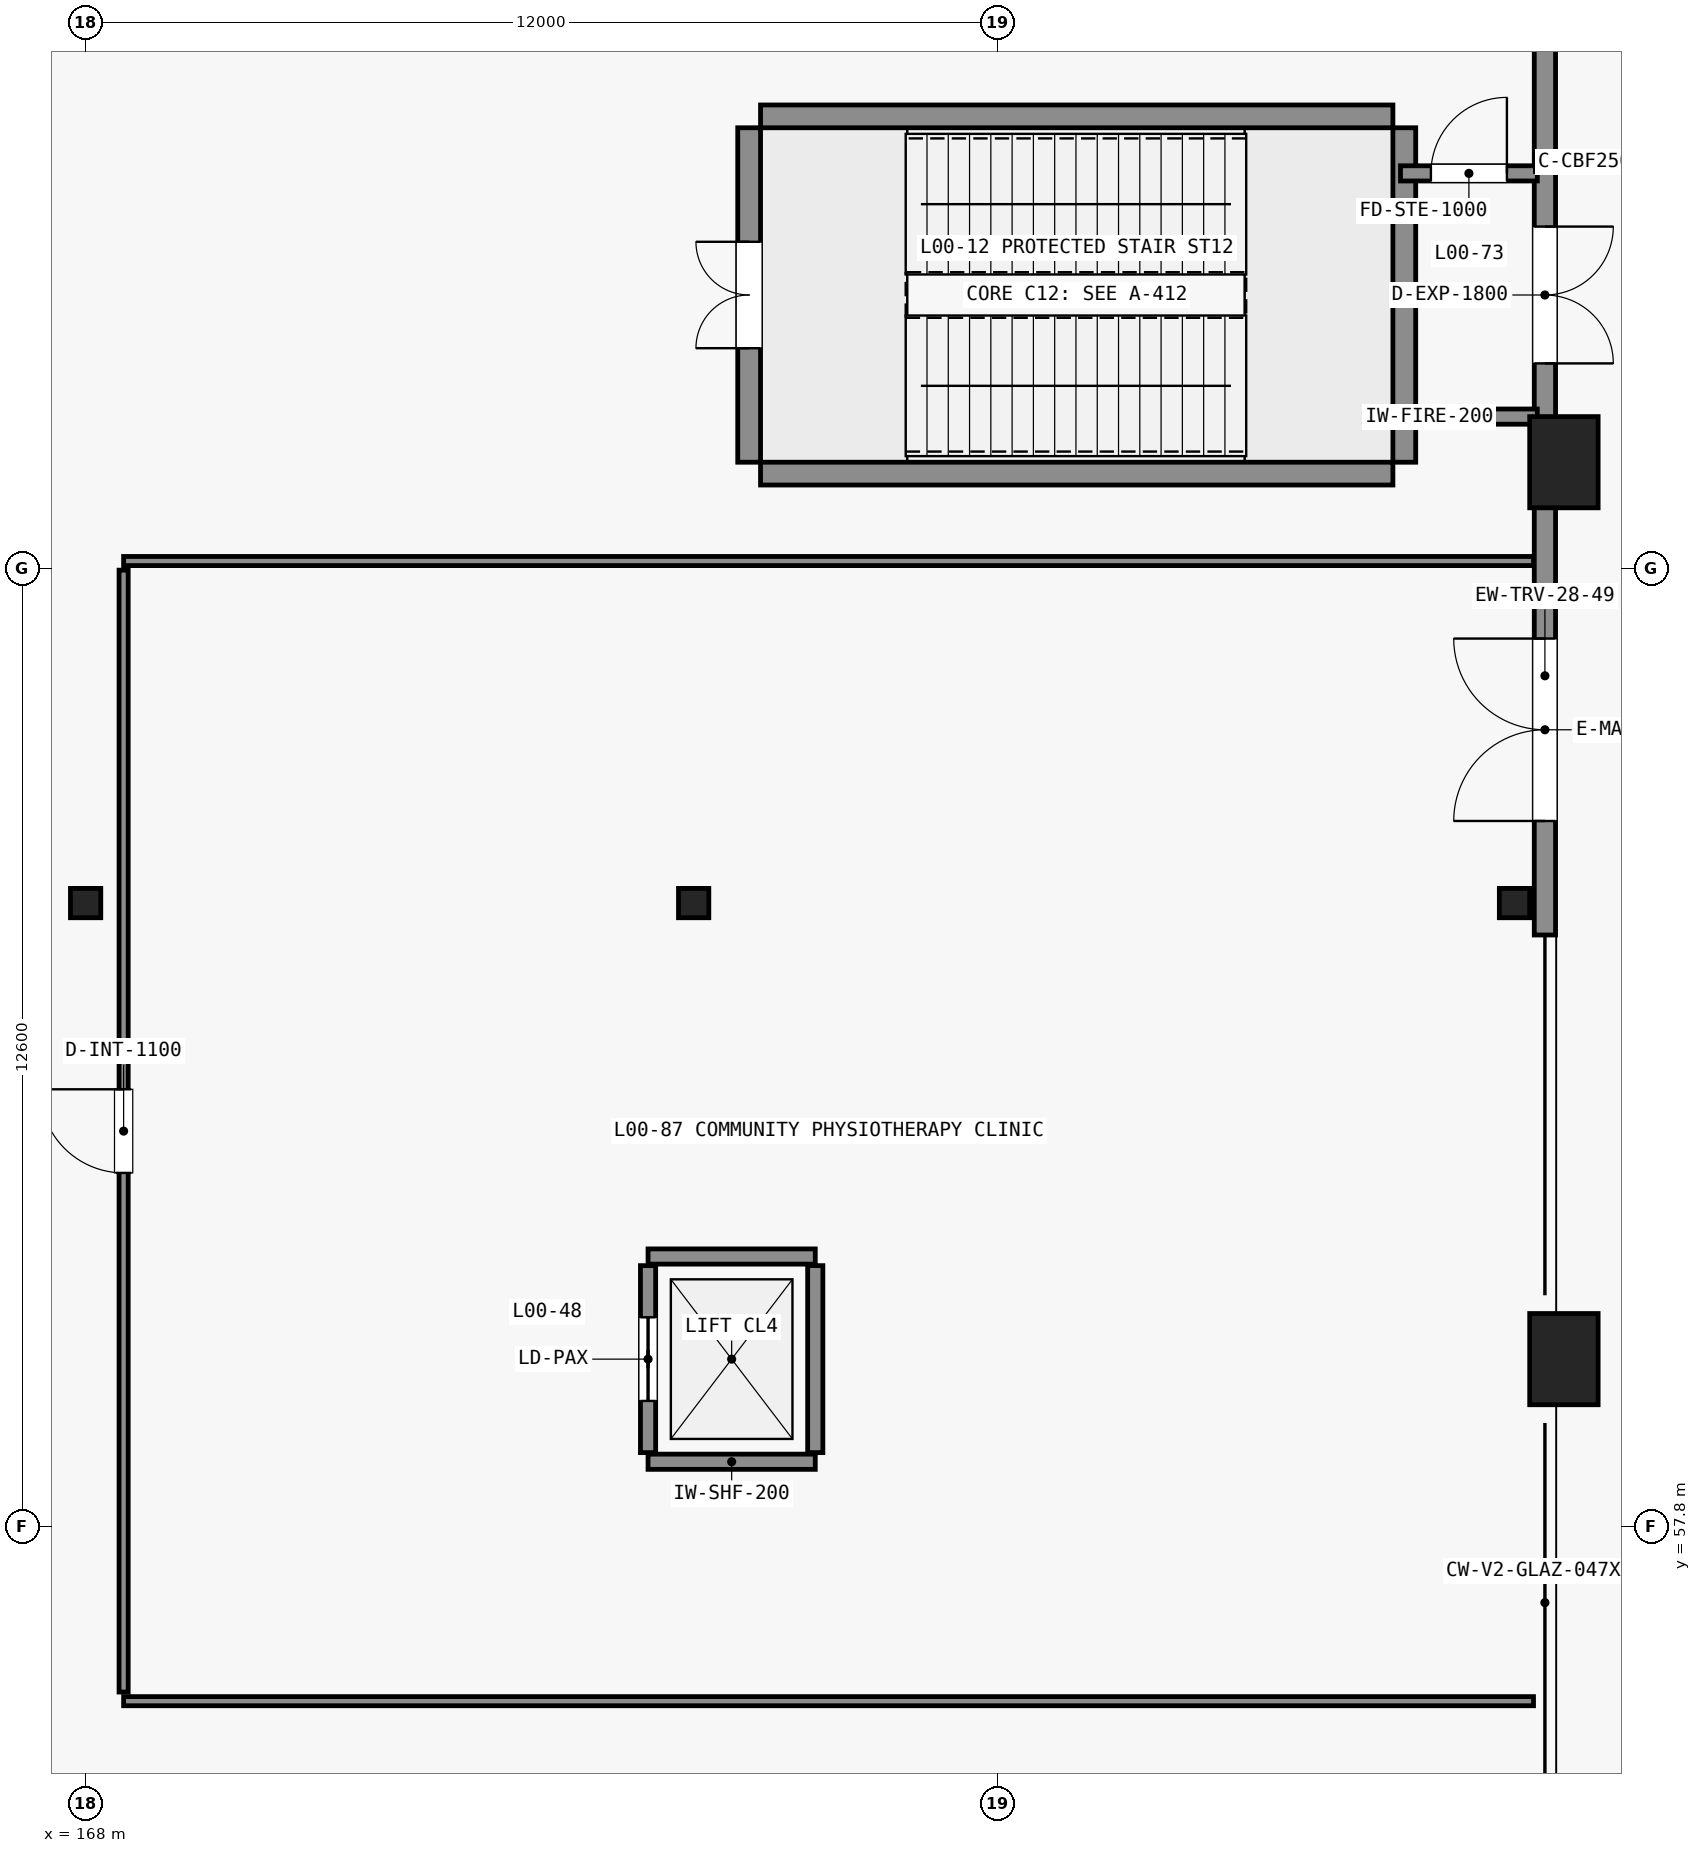
"""IFC4 building model, lengths in metres.
Left out: names, types, materials, properties, quantities, classifications, styles, units other than length and angle.
Written with IfcOpenShell. Run it as: python <this file> out.ifc"""

import sys

from ifc_helpers import new_model, si_unit, direction, frame, frame_2d, origin, origin_2d, place, context, subcontext, project, spatial, rectangle, hollow_rectangle, i_section, extrude, element, fill, save


model = new_model("IFC4")
c1 = context("Model", 3, precision=1e-05, world=origin(), true_north=direction((0.0, 1.0)))
c2 = subcontext(c1, "Body", "Model", "MODEL_VIEW")
j1 = project(units=[si_unit("LENGTHUNIT", "METRE"), si_unit("PLANEANGLEUNIT", "RADIAN")], contexts=[c1])
p1 = place(None, origin())
s1 = spatial("IfcSite", under=j1, at=p1, CompositionType="ELEMENT")
p2 = place(p1, origin())
s2 = spatial("IfcBuilding", under=s1, at=p2, CompositionType="ELEMENT")
p3 = place(p2, origin())
s3 = spatial("IfcBuildingStorey", under=s2, at=p3, CompositionType="ELEMENT", Elevation=0.0)
for number, where, z_axis, x_axis in (
    (1, (187.45, 60.0, -0.45), (0.0, 0.0, 1.0), (1.0, 0.0, 0.0)),
    (2, (187.45, 71.8, -0.45), (0.0, 0.0, 1.0), (1.0, 0.0, 0.0)),
):
    element("IfcColumn", number, at=place(p3, frame(where, z_axis=z_axis, x_axis=x_axis)), inside=s3, PredefinedType="PILASTER", context=c2, shape_type="SweptSolid", body=[
        extrude(rectangle(XDim=0.9, YDim=1.2, at=origin_2d()), origin(), (0.0, 0.0, 1.0), 6.45),
    ])
p4 = place(p3, frame((187.2, 75.75, -0.45), z_axis=(0.0, 0.0, 1.0), x_axis=(1.0, 0.0, 0.0)))
e3 = element("IfcColumn", 3, at=p4, inside=s3, PredefinedType="COLUMN", context=c2, shape_type="SweptSolid", body=[
    extrude(hollow_rectangle(XDim=0.25, YDim=0.25, WallThickness=0.012, at=origin_2d()), origin(), (0.0, 0.0, 1.0), 6.45),
])
for number, where, z_axis, x_axis in (
    (4, (168.0, 66.0, -0.45), (0.0, 0.0, 1.0), (1.0, 0.0, 0.0)),
    (5, (176.0, 66.0, -0.45), (0.0, 0.0, 1.0), (1.0, 0.0, 0.0)),
    (6, (186.8, 66.0, -0.45), (0.0, 0.0, 1.0), (1.0, 0.0, 0.0)),
):
    element("IfcColumn", number, at=place(p3, frame(where, z_axis=z_axis, x_axis=x_axis)), inside=s3, PredefinedType="COLUMN", context=c2, shape_type="SweptSolid", body=[
        extrude(i_section(OverallWidth=0.399, OverallDepth=0.386, WebThickness=0.021, FlangeThickness=0.033, FilletRadius=0.018, at=origin_2d()), origin(), (0.0, 0.0, 1.0), 6.45),
    ])
for number, where, z_axis, x_axis in (
    (7, (176.88, 71.65, 0.0), (0.0, 0.0, 1.0), (1.0, 0.0, 0.0)),
    (8, (176.88, 76.35, 0.0), (0.0, 0.0, 1.0), (1.0, 0.0, 0.0)),
):
    element("IfcWall", number, at=place(p3, frame(where, z_axis=z_axis, x_axis=x_axis)), inside=s3, PredefinedType="SHEAR", context=c2, shape_type="SweptSolid", body=[
        extrude(rectangle(XDim=8.32, YDim=0.3, at=frame_2d((4.16, 0.0))), origin(), (0.0, 0.0, 1.0), 6.0),
    ])
p5 = place(p3, frame((176.73, 71.8, 0.0), z_axis=(0.0, 0.0, 1.0), x_axis=(0.0, 1.0, 0.0)))
e9 = element("IfcWall", 9, at=p5, inside=s3, PredefinedType="SHEAR", context=c2, shape_type="SweptSolid", body=[
    extrude(rectangle(XDim=4.4, YDim=0.3, at=frame_2d((2.2, 0.0))), origin(), (0.0, 0.0, 1.0), 6.0),
])
p6 = place(p5, frame((1.5, 0.0, 0.0)))
e10 = element("IfcOpeningElement", 10, at=p6, cuts=e9, PredefinedType="OPENING", context=c2, shape_type="SweptSolid", body=[
    extrude(rectangle(XDim=1.4, YDim=2.2, at=frame_2d((0.7, 1.1))), frame((0.0, 0.16, 0.0), z_axis=(0.0, -1.0, 0.0), x_axis=(1.0, 0.0, 0.0)), (0.0, 0.0, 1.0), 0.32),
])
p7 = place(p3, frame((185.35, 71.8, 0.0), z_axis=(0.0, 0.0, 1.0), x_axis=(0.0, 1.0, 0.0)))
e11 = element("IfcWall", 11, at=p7, inside=s3, PredefinedType="SHEAR", context=c2, shape_type="SweptSolid", body=[
    extrude(rectangle(XDim=4.4, YDim=0.3, at=frame_2d((2.2, 0.0))), origin(), (0.0, 0.0, 1.0), 6.0),
])
for number, where, z_axis, x_axis in (
    (12, (175.4, 58.65, 0.0), (0.0, 0.0, 1.0), (1.0, 0.0, 0.0)),
    (13, (175.4, 61.35, 0.0), (0.0, 0.0, 1.0), (1.0, 0.0, 0.0)),
):
    element("IfcWall", number, at=place(p3, frame(where, z_axis=z_axis, x_axis=x_axis)), inside=s3, PredefinedType="STANDARD", context=c2, shape_type="SweptSolid", body=[
        extrude(rectangle(XDim=2.2, YDim=0.2, at=frame_2d((1.1, 0.0))), origin(), (0.0, 0.0, 1.0), 4.927),
    ])
p8 = place(p3, frame((175.4, 58.77, 0.0), z_axis=(0.0, 0.0, 1.0), x_axis=(0.0, 1.0, 0.0)))
e14 = element("IfcWall", 14, at=p8, inside=s3, PredefinedType="STANDARD", context=c2, shape_type="SweptSolid", body=[
    extrude(rectangle(XDim=2.46, YDim=0.2, at=frame_2d((1.23, 0.0))), origin(), (0.0, 0.0, 1.0), 5.62),
])
p9 = place(p8, frame((0.68, 0.0, 0.0)))
e15 = element("IfcOpeningElement", 15, at=p9, cuts=e14, PredefinedType="OPENING", context=c2, shape_type="SweptSolid", body=[
    extrude(rectangle(XDim=1.1, YDim=2.15, at=frame_2d((0.55, 1.075))), frame((0.0, 0.11, 0.0), z_axis=(0.0, -1.0, 0.0), x_axis=(1.0, 0.0, 0.0)), (0.0, 0.0, 1.0), 0.22),
])
p10 = place(p3, frame((177.6, 58.77, 0.0), z_axis=(0.0, 0.0, 1.0), x_axis=(0.0, 1.0, 0.0)))
e16 = element("IfcWall", 16, at=p10, inside=s3, PredefinedType="STANDARD", context=c2, shape_type="SweptSolid", body=[
    extrude(rectangle(XDim=2.46, YDim=0.2, at=frame_2d((1.23, 0.0))), origin(), (0.0, 0.0, 1.0), 5.62),
])
p11 = place(p3, frame((187.2, 65.58, 0.0), z_axis=(0.0, 0.0, 1.0), x_axis=(0.0, 1.0, 0.0)))
e17 = element("IfcWall", 17, at=p11, inside=s3, PredefinedType="STANDARD", context=c2, shape_type="SweptSolid", body=[
    extrude(rectangle(XDim=6.82, YDim=0.28, at=frame_2d((3.41, 0.0))), origin(), (0.0, 0.0, 1.0), 4.927),
])
p12 = place(p11, frame((1.5, 0.0, 0.0)))
e18 = element("IfcOpeningElement", 18, at=p12, cuts=e17, PredefinedType="OPENING", context=c2, shape_type="SweptSolid", body=[
    extrude(rectangle(XDim=2.4, YDim=2.5, at=frame_2d((1.2, 1.25))), frame((0.0, 0.15, 0.0), z_axis=(0.0, -1.0, 0.0), x_axis=(1.0, 0.0, 0.0)), (0.0, 0.0, 1.0), 0.3),
])
p13 = place(p3, frame((187.2, 75.6, 0.0), z_axis=(0.0, 0.0, 1.0), x_axis=(0.0, 1.0, 0.0)))
e19 = element("IfcWall", 19, at=p13, inside=s3, PredefinedType="STANDARD", context=c2, shape_type="SweptSolid", body=[
    extrude(rectangle(XDim=2.6, YDim=0.28, at=frame_2d((1.3, 0.0))), origin(), (0.0, 0.0, 1.0), 4.927),
])
p14 = place(p3, frame((187.2, 75.65, 0.0), z_axis=(0.0, 0.0, 1.0), x_axis=(0.0, -1.0, 0.0)))
e20 = element("IfcWall", 20, at=p14, inside=s3, PredefinedType="STANDARD", context=c2, shape_type="SweptSolid", body=[
    extrude(rectangle(XDim=3.3, YDim=0.28, at=frame_2d((1.65, 0.0))), origin(), (0.0, 0.0, 1.0), 5.62),
])
p15 = place(p14, frame((0.75, 0.0, 0.0)))
e21 = element("IfcOpeningElement", 21, at=p15, cuts=e20, PredefinedType="OPENING", context=c2, shape_type="SweptSolid", body=[
    extrude(rectangle(XDim=1.8, YDim=2.25, at=frame_2d((0.9, 1.125))), frame((0.0, 0.15, 0.0), z_axis=(0.0, -1.0, 0.0), x_axis=(1.0, 0.0, 0.0)), (0.0, 0.0, 1.0), 0.3),
])
p16 = place(p3, frame((185.3, 72.4, 0.0), z_axis=(0.0, 0.0, 1.0), x_axis=(1.0, 0.0, 0.0)))
e22 = element("IfcWall", 22, at=p16, inside=s3, PredefinedType="STANDARD", context=c2, shape_type="SweptSolid", body=[
    extrude(rectangle(XDim=1.8, YDim=0.2, at=frame_2d((0.9, 0.0))), origin(), (0.0, 0.0, 1.0), 4.927),
])
p17 = place(p3, frame((185.3, 75.6, 0.0), z_axis=(0.0, 0.0, 1.0), x_axis=(1.0, 0.0, 0.0)))
e23 = element("IfcWall", 23, at=p17, inside=s3, PredefinedType="STANDARD", context=c2, shape_type="SweptSolid", body=[
    extrude(rectangle(XDim=1.8, YDim=0.2, at=frame_2d((0.9, 0.0))), origin(), (0.0, 0.0, 1.0), 4.927),
])
p18 = place(p17, frame((0.4, 0.0, 0.0)))
e24 = element("IfcOpeningElement", 24, at=p18, cuts=e23, PredefinedType="OPENING", context=c2, shape_type="SweptSolid", body=[
    extrude(rectangle(XDim=1.0, YDim=2.15, at=frame_2d((0.5, 1.075))), frame((0.0, 0.11, 0.0), z_axis=(0.0, -1.0, 0.0), x_axis=(1.0, 0.0, 0.0)), (0.0, 0.0, 1.0), 0.22),
])
for number, where, z_axis, x_axis in (
    (25, (168.5, 55.5, 0.0), (0.0, 0.0, 1.0), (1.0, 0.0, 0.0)),
    (26, (168.5, 70.5, 0.0), (0.0, 0.0, 1.0), (1.0, 0.0, 0.0)),
):
    element("IfcWall", number, at=place(p3, frame(where, z_axis=z_axis, x_axis=x_axis)), inside=s3, PredefinedType="PARTITIONING", context=c2, shape_type="SweptSolid", body=[
        extrude(rectangle(XDim=18.55, YDim=0.12, at=frame_2d((9.275, 0.0))), origin(), (0.0, 0.0, 1.0), 4.927),
    ])
p19 = place(p3, frame((168.5, 55.62, 0.0), z_axis=(0.0, 0.0, 1.0), x_axis=(0.0, 1.0, 0.0)))
e27 = element("IfcWall", 27, at=p19, inside=s3, PredefinedType="PARTITIONING", context=c2, shape_type="SweptSolid", body=[
    extrude(rectangle(XDim=14.76, YDim=0.12, at=frame_2d((7.38, 0.0))), origin(), (0.0, 0.0, 1.0), 4.927),
])
p20 = place(p19, frame((6.83, 0.0, 0.0)))
e28 = element("IfcOpeningElement", 28, at=p20, cuts=e27, PredefinedType="OPENING", context=c2, shape_type="SweptSolid", body=[
    extrude(rectangle(XDim=1.1, YDim=2.2, at=frame_2d((0.55, 1.1))), frame((0.0, 0.07, 0.0), z_axis=(0.0, -1.0, 0.0), x_axis=(1.0, 0.0, 0.0)), (0.0, 0.0, 1.0), 0.14),
])
p21 = place(p9, origin())
e29 = element("IfcDoor", 29, at=p21, inside=s3, OperationType="SLIDING_TO_LEFT", PredefinedType="DOOR", context=c2, shape_type="SweptSolid", body=[
    extrude(rectangle(XDim=1.1, YDim=2.15, at=frame_2d((0.55, 1.075))), frame((0.0, 0.025, 0.0), z_axis=(0.0, -1.0, 0.0), x_axis=(1.0, 0.0, 0.0)), (0.0, 0.0, 1.0), 0.05),
])
fill(e15, e29)
p22 = place(p12, origin())
e30 = element("IfcDoor", 30, at=p22, inside=s3, OperationType="DOUBLE_DOOR_SINGLE_SWING", PredefinedType="DOOR", context=c2, shape_type="SweptSolid", body=[
    extrude(rectangle(XDim=2.4, YDim=2.5, at=frame_2d((1.2, 1.25))), frame((0.0, 0.025, 0.0), z_axis=(0.0, -1.0, 0.0), x_axis=(1.0, 0.0, 0.0)), (0.0, 0.0, 1.0), 0.05),
])
fill(e18, e30)
p23 = place(p6, origin())
e31 = element("IfcDoor", 31, at=p23, inside=s3, OperationType="DOUBLE_DOOR_SINGLE_SWING", PredefinedType="DOOR", context=c2, shape_type="SweptSolid", body=[
    extrude(rectangle(XDim=1.4, YDim=2.2, at=frame_2d((0.7, 1.1))), frame((0.0, 0.025, 0.0), z_axis=(0.0, -1.0, 0.0), x_axis=(1.0, 0.0, 0.0)), (0.0, 0.0, 1.0), 0.05),
])
fill(e10, e31)
p24 = place(p15, origin())
e32 = element("IfcDoor", 32, at=p24, inside=s3, OperationType="DOUBLE_DOOR_SINGLE_SWING", PredefinedType="DOOR", context=c2, shape_type="SweptSolid", body=[
    extrude(rectangle(XDim=1.8, YDim=2.25, at=frame_2d((0.9, 1.125))), frame((0.0, 0.025, 0.0), z_axis=(0.0, -1.0, 0.0), x_axis=(1.0, 0.0, 0.0)), (0.0, 0.0, 1.0), 0.05),
])
fill(e21, e32)
p25 = place(p18, origin())
e33 = element("IfcDoor", 33, at=p25, inside=s3, OperationType="SINGLE_SWING_RIGHT", PredefinedType="DOOR", context=c2, shape_type="SweptSolid", body=[
    extrude(rectangle(XDim=1.0, YDim=2.15, at=frame_2d((0.5, 1.075))), frame((0.0, 0.025, 0.0), z_axis=(0.0, -1.0, 0.0), x_axis=(1.0, 0.0, 0.0)), (0.0, 0.0, 1.0), 0.05),
])
fill(e24, e33)
p26 = place(p20, origin())
e34 = element("IfcDoor", 34, at=p26, inside=s3, OperationType="SINGLE_SWING_RIGHT", PredefinedType="DOOR", context=c2, shape_type="SweptSolid", body=[
    extrude(rectangle(XDim=1.1, YDim=2.2, at=frame_2d((0.55, 1.1))), frame((0.0, 0.025, 0.0), z_axis=(0.0, -1.0, 0.0), x_axis=(1.0, 0.0, 0.0)), (0.0, 0.0, 1.0), 0.05),
])
fill(e28, e34)
save(model, sys.argv[1])
